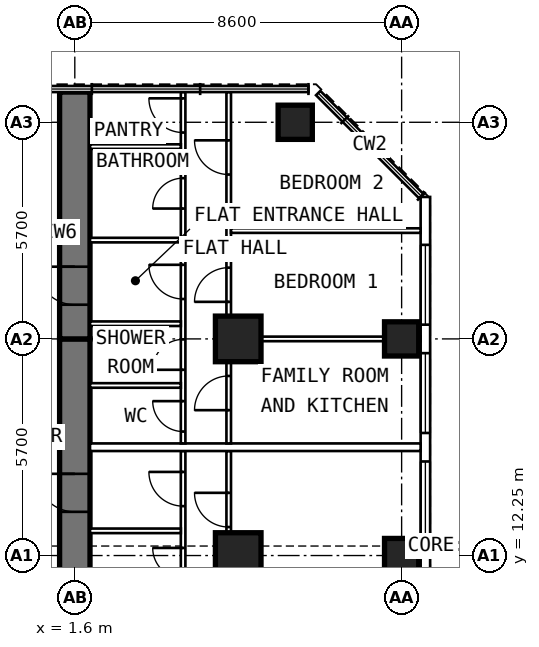
"""IFC4 building model, lengths in metres.
Left out: names, types, materials, properties, quantities, classifications, styles, units other than length and angle.
Written with IfcOpenShell. Run it as: python <this file> out.ifc"""

import sys

from ifc_helpers import new_model, si_unit, direction, frame, frame_2d, origin, origin_2d, place, context, subcontext, project, spatial, rectangle, extrude, element, fill, save


model = new_model("IFC4")
c1 = context("Model", 3, precision=1e-05, world=origin(), true_north=direction((0.0, 1.0)))
c2 = subcontext(c1, "Body", "Model", "MODEL_VIEW")
j1 = project(units=[si_unit("LENGTHUNIT", "METRE"), si_unit("PLANEANGLEUNIT", "RADIAN")], contexts=[c1])
p1 = place(None, origin())
s1 = spatial("IfcSite", under=j1, at=p1, CompositionType="ELEMENT")
p2 = place(p1, origin())
s2 = spatial("IfcBuilding", under=s1, at=p2, CompositionType="ELEMENT")
p3 = place(p2, frame((0.0, 0.0, 141.8)))
s3 = spatial("IfcBuildingStorey", under=s2, at=p3, CompositionType="ELEMENT", Elevation=141.8)
for number, where, z_axis, x_axis in (
    (1, (10.2, 12.25, 0.0), (0.0, 0.0, 1.0), (0.0, 1.0, 0.0)),
    (2, (10.2, 17.95, 0.0), (0.0, 0.0, 1.0), (0.0, 1.0, 0.0)),
    (3, (7.4, 23.65, 0.0), (0.0, 0.0, 1.0), (0.0, 1.0, 0.0)),
):
    element("IfcColumn", number, at=place(p3, frame(where, z_axis=z_axis, x_axis=x_axis)), inside=s3, PredefinedType="COLUMN", context=c2, shape_type="SweptSolid", body=[
        extrude(rectangle(XDim=0.9, YDim=0.9, at=origin_2d()), origin(), (0.0, 0.0, 1.0), 3.6),
    ])
for number, where, z_axis, x_axis in (
    (4, (5.9, 12.25, 0.0), (0.0, 0.0, 1.0), (0.0, 1.0, 0.0)),
    (5, (5.9, 17.95, 0.0), (0.0, 0.0, 1.0), (0.0, 1.0, 0.0)),
):
    element("IfcColumn", number, at=place(p3, frame(where, z_axis=z_axis, x_axis=x_axis)), inside=s3, PredefinedType="COLUMN", context=c2, shape_type="SweptSolid", body=[
        extrude(rectangle(XDim=1.2, YDim=1.2, at=origin_2d()), origin(), (0.0, 0.0, 1.0), 3.6),
    ])
p4 = place(p3, frame((1.6, 9.6, 0.0), z_axis=(0.0, 0.0, 1.0), x_axis=(0.0, 1.0, 0.0)))
e6 = element("IfcWall", 6, at=p4, inside=s3, PredefinedType="SHEAR", context=c2, shape_type="SweptSolid", body=[
    extrude(rectangle(XDim=8.35, YDim=0.8, at=frame_2d((4.175, 0.0))), origin(), (0.0, 0.0, 1.0), 3.6),
])
p5 = place(p4, frame((3.8, 0.0, 0.0)))
e7 = element("IfcOpeningElement", 7, at=p5, cuts=e6, PredefinedType="OPENING", context=c2, shape_type="SweptSolid", body=[
    extrude(rectangle(XDim=1.0, YDim=2.1, at=frame_2d((0.5, 1.05))), frame((0.0, 0.412, 0.0), z_axis=(0.0, -1.0, 0.0), x_axis=(1.0, 0.0, 0.0)), (0.0, 0.0, 1.0), 0.824),
])
p6 = place(p3, frame((1.6, 17.95, 0.0), z_axis=(0.0, 0.0, 1.0), x_axis=(0.0, 1.0, 0.0)))
e8 = element("IfcWall", 8, at=p6, inside=s3, PredefinedType="SHEAR", context=c2, shape_type="SweptSolid", body=[
    extrude(rectangle(XDim=6.495, YDim=0.8, at=frame_2d((3.248, 0.0))), origin(), (0.0, 0.0, 1.0), 3.6),
])
p7 = place(p6, frame((0.9, 0.0, 0.0)))
e9 = element("IfcOpeningElement", 9, at=p7, cuts=e8, PredefinedType="OPENING", context=c2, shape_type="SweptSolid", body=[
    extrude(rectangle(XDim=1.0, YDim=2.1, at=frame_2d((0.5, 1.05))), frame((0.0, 0.412, 0.0), z_axis=(0.0, -1.0, 0.0), x_axis=(1.0, 0.0, 0.0)), (0.0, 0.0, 1.0), 0.824),
])
p8 = place(p3, frame((10.825, 6.409, 0.0), z_axis=(0.0, 0.0, 1.0), x_axis=(0.0, 1.0, 0.0)))
e10 = element("IfcWall", 10, at=p8, inside=s3, PredefinedType="SOLIDWALL", context=c2, shape_type="SweptSolid", body=[
    extrude(rectangle(XDim=15.276, YDim=0.25, at=frame_2d((7.638, 0.0))), origin(), (0.0, 0.0, 1.0), 3.35),
])
p9 = place(p8, frame((0.516, 0.0, 0.8)))
e11 = element("IfcOpeningElement", 11, at=p9, cuts=e10, PredefinedType="OPENING", context=c2, shape_type="SweptSolid", body=[
    extrude(rectangle(XDim=2.1, YDim=1.8, at=frame_2d((1.05, 0.9))), frame((0.0, 0.137, 0.0), z_axis=(0.0, -1.0, 0.0), x_axis=(1.0, 0.0, 0.0)), (0.0, 0.0, 1.0), 0.274),
])
p10 = place(p8, frame((3.366, 0.0, 0.8)))
e12 = element("IfcOpeningElement", 12, at=p10, cuts=e10, PredefinedType="OPENING", context=c2, shape_type="SweptSolid", body=[
    extrude(rectangle(XDim=2.1, YDim=1.8, at=frame_2d((1.05, 0.9))), frame((0.0, 0.137, 0.0), z_axis=(0.0, -1.0, 0.0), x_axis=(1.0, 0.0, 0.0)), (0.0, 0.0, 1.0), 0.274),
])
p11 = place(p8, frame((6.216, 0.0, 0.8)))
e13 = element("IfcOpeningElement", 13, at=p11, cuts=e10, PredefinedType="OPENING", context=c2, shape_type="SweptSolid", body=[
    extrude(rectangle(XDim=2.1, YDim=1.8, at=frame_2d((1.05, 0.9))), frame((0.0, 0.137, 0.0), z_axis=(0.0, -1.0, 0.0), x_axis=(1.0, 0.0, 0.0)), (0.0, 0.0, 1.0), 0.274),
])
p12 = place(p8, frame((9.066, 0.0, 0.8)))
e14 = element("IfcOpeningElement", 14, at=p12, cuts=e10, PredefinedType="OPENING", context=c2, shape_type="SweptSolid", body=[
    extrude(rectangle(XDim=2.1, YDim=1.8, at=frame_2d((1.05, 0.9))), frame((0.0, 0.137, 0.0), z_axis=(0.0, -1.0, 0.0), x_axis=(1.0, 0.0, 0.0)), (0.0, 0.0, 1.0), 0.274),
])
p13 = place(p8, frame((11.916, 0.0, 0.8)))
e15 = element("IfcOpeningElement", 15, at=p13, cuts=e10, PredefinedType="OPENING", context=c2, shape_type="SweptSolid", body=[
    extrude(rectangle(XDim=2.1, YDim=1.8, at=frame_2d((1.05, 0.9))), frame((0.0, 0.137, 0.0), z_axis=(0.0, -1.0, 0.0), x_axis=(1.0, 0.0, 0.0)), (0.0, 0.0, 1.0), 0.274),
])
p14 = place(p3, frame((4.45, 10.05, 0.0), z_axis=(0.0, 0.0, 1.0), x_axis=(0.0, 1.0, 0.0)))
e16 = element("IfcWall", 16, at=p14, inside=s3, PredefinedType="PARTITIONING", context=c2, shape_type="SweptSolid", body=[
    extrude(rectangle(XDim=4.95, YDim=0.12, at=frame_2d((2.475, 0.0))), origin(), (0.0, 0.0, 1.0), 3.35),
])
p15 = place(p14, frame((1.6, 0.0, 0.0)))
e17 = element("IfcOpeningElement", 17, at=p15, cuts=e16, PredefinedType="OPENING", context=c2, shape_type="SweptSolid", body=[
    extrude(rectangle(XDim=0.8, YDim=2.1, at=frame_2d((0.4, 1.05))), frame((0.0, 0.072, 0.0), z_axis=(0.0, -1.0, 0.0), x_axis=(1.0, 0.0, 0.0)), (0.0, 0.0, 1.0), 0.144),
])
p16 = place(p14, frame((3.5, 0.0, 0.0)))
e18 = element("IfcOpeningElement", 18, at=p16, cuts=e16, PredefinedType="OPENING", context=c2, shape_type="SweptSolid", body=[
    extrude(rectangle(XDim=0.9, YDim=2.1, at=frame_2d((0.45, 1.05))), frame((0.0, 0.072, 0.0), z_axis=(0.0, -1.0, 0.0), x_axis=(1.0, 0.0, 0.0)), (0.0, 0.0, 1.0), 0.144),
])
p17 = place(p3, frame((5.65, 9.6, 0.0), z_axis=(0.0, 0.0, 1.0), x_axis=(0.0, 1.0, 0.0)))
e19 = element("IfcWall", 19, at=p17, inside=s3, PredefinedType="PARTITIONING", context=c2, shape_type="SweptSolid", body=[
    extrude(rectangle(XDim=5.4, YDim=0.12, at=frame_2d((2.7, 0.0))), origin(), (0.0, 0.0, 1.0), 3.35),
])
p18 = place(p17, frame((3.4, 0.0, 0.0)))
e20 = element("IfcOpeningElement", 20, at=p18, cuts=e19, PredefinedType="OPENING", context=c2, shape_type="SweptSolid", body=[
    extrude(rectangle(XDim=0.9, YDim=2.1, at=frame_2d((0.45, 1.05))), frame((0.0, 0.072, 0.0), z_axis=(0.0, -1.0, 0.0), x_axis=(1.0, 0.0, 0.0)), (0.0, 0.0, 1.0), 0.144),
])
p19 = place(p3, frame((2.0, 12.9, 0.0), z_axis=(0.0, 0.0, 1.0), x_axis=(1.0, 0.0, 0.0)))
e21 = element("IfcWall", 21, at=p19, inside=s3, PredefinedType="PARTITIONING", context=c2, shape_type="SweptSolid", body=[
    extrude(rectangle(XDim=2.39, YDim=0.12, at=frame_2d((1.195, 0.0))), origin(), (0.0, 0.0, 1.0), 3.35),
])
p20 = place(p3, frame((4.45, 15.2, 0.0), z_axis=(0.0, 0.0, 1.0), x_axis=(0.0, 1.0, 0.0)))
e22 = element("IfcWall", 22, at=p20, inside=s3, PredefinedType="PARTITIONING", context=c2, shape_type="SweptSolid", body=[
    extrude(rectangle(XDim=9.245, YDim=0.12, at=frame_2d((4.623, 0.0))), origin(), (0.0, 0.0, 1.0), 3.35),
])
p21 = place(p20, frame((0.312, 0.0, 0.0)))
e23 = element("IfcOpeningElement", 23, at=p21, cuts=e22, PredefinedType="OPENING", context=c2, shape_type="SweptSolid", body=[
    extrude(rectangle(XDim=0.8, YDim=2.1, at=frame_2d((0.4, 1.05))), frame((0.0, 0.072, 0.0), z_axis=(0.0, -1.0, 0.0), x_axis=(1.0, 0.0, 0.0)), (0.0, 0.0, 1.0), 0.144),
])
p22 = place(p20, frame((1.938, 0.0, 0.0)))
e24 = element("IfcOpeningElement", 24, at=p22, cuts=e22, PredefinedType="OPENING", context=c2, shape_type="SweptSolid", body=[
    extrude(rectangle(XDim=0.8, YDim=2.1, at=frame_2d((0.4, 1.05))), frame((0.0, 0.072, 0.0), z_axis=(0.0, -1.0, 0.0), x_axis=(1.0, 0.0, 0.0)), (0.0, 0.0, 1.0), 0.144),
])
p23 = place(p20, frame((3.8, 0.0, 0.0)))
e25 = element("IfcOpeningElement", 25, at=p23, cuts=e22, PredefinedType="OPENING", context=c2, shape_type="SweptSolid", body=[
    extrude(rectangle(XDim=0.9, YDim=2.1, at=frame_2d((0.45, 1.05))), frame((0.0, 0.072, 0.0), z_axis=(0.0, -1.0, 0.0), x_axis=(1.0, 0.0, 0.0)), (0.0, 0.0, 1.0), 0.144),
])
p24 = place(p20, frame((6.18, 0.0, 0.0)))
e26 = element("IfcOpeningElement", 26, at=p24, cuts=e22, PredefinedType="OPENING", context=c2, shape_type="SweptSolid", body=[
    extrude(rectangle(XDim=0.8, YDim=2.1, at=frame_2d((0.4, 1.05))), frame((0.0, 0.072, 0.0), z_axis=(0.0, -1.0, 0.0), x_axis=(1.0, 0.0, 0.0)), (0.0, 0.0, 1.0), 0.144),
])
p25 = place(p20, frame((8.18, 0.0, 0.0)))
e27 = element("IfcOpeningElement", 27, at=p25, cuts=e22, PredefinedType="OPENING", context=c2, shape_type="SweptSolid", body=[
    extrude(rectangle(XDim=0.9, YDim=2.1, at=frame_2d((0.45, 1.05))), frame((0.0, 0.072, 0.0), z_axis=(0.0, -1.0, 0.0), x_axis=(1.0, 0.0, 0.0)), (0.0, 0.0, 1.0), 0.144),
])
p26 = place(p3, frame((5.65, 15.2, 0.0), z_axis=(0.0, 0.0, 1.0), x_axis=(0.0, 1.0, 0.0)))
e28 = element("IfcWall", 28, at=p26, inside=s3, PredefinedType="PARTITIONING", context=c2, shape_type="SweptSolid", body=[
    extrude(rectangle(XDim=9.245, YDim=0.12, at=frame_2d((4.623, 0.0))), origin(), (0.0, 0.0, 1.0), 3.35),
])
p27 = place(p26, frame((0.875, 0.0, 0.0)))
e29 = element("IfcOpeningElement", 29, at=p27, cuts=e28, PredefinedType="OPENING", context=c2, shape_type="SweptSolid", body=[
    extrude(rectangle(XDim=0.9, YDim=2.1, at=frame_2d((0.45, 1.05))), frame((0.0, 0.072, 0.0), z_axis=(0.0, -1.0, 0.0), x_axis=(1.0, 0.0, 0.0)), (0.0, 0.0, 1.0), 0.144),
])
p28 = place(p26, frame((3.725, 0.0, 0.0)))
e30 = element("IfcOpeningElement", 30, at=p28, cuts=e28, PredefinedType="OPENING", context=c2, shape_type="SweptSolid", body=[
    extrude(rectangle(XDim=0.9, YDim=2.1, at=frame_2d((0.45, 1.05))), frame((0.0, 0.072, 0.0), z_axis=(0.0, -1.0, 0.0), x_axis=(1.0, 0.0, 0.0)), (0.0, 0.0, 1.0), 0.144),
])
p29 = place(p26, frame((7.075, 0.0, 0.0)))
e31 = element("IfcOpeningElement", 31, at=p29, cuts=e28, PredefinedType="OPENING", context=c2, shape_type="SweptSolid", body=[
    extrude(rectangle(XDim=0.9, YDim=2.1, at=frame_2d((0.45, 1.05))), frame((0.0, 0.072, 0.0), z_axis=(0.0, -1.0, 0.0), x_axis=(1.0, 0.0, 0.0)), (0.0, 0.0, 1.0), 0.144),
])
p30 = place(p3, frame((5.71, 17.95, 0.0), z_axis=(0.0, 0.0, 1.0), x_axis=(1.0, 0.0, 0.0)))
e32 = element("IfcWall", 32, at=p30, inside=s3, PredefinedType="PARTITIONING", context=c2, shape_type="SweptSolid", body=[
    extrude(rectangle(XDim=4.99, YDim=0.12, at=frame_2d((2.495, 0.0))), origin(), (0.0, 0.0, 1.0), 2.45),
])
p31 = place(p3, frame((5.71, 20.8, 0.0), z_axis=(0.0, 0.0, 1.0), x_axis=(1.0, 0.0, 0.0)))
e33 = element("IfcWall", 33, at=p31, inside=s3, PredefinedType="PARTITIONING", context=c2, shape_type="SweptSolid", body=[
    extrude(rectangle(XDim=4.99, YDim=0.12, at=frame_2d((2.495, 0.0))), origin(), (0.0, 0.0, 1.0), 3.35),
])
for number, where, z_axis, x_axis in (
    (34, (2.0, 16.725, 0.0), (0.0, 0.0, 1.0), (1.0, 0.0, 0.0)),
    (35, (2.0, 18.35, 0.0), (0.0, 0.0, 1.0), (1.0, 0.0, 0.0)),
    (36, (2.0, 20.55, 0.0), (0.0, 0.0, 1.0), (1.0, 0.0, 0.0)),
    (37, (2.0, 23.01, 0.0), (0.0, 0.0, 1.0), (1.0, 0.0, 0.0)),
):
    element("IfcWall", number, at=place(p3, frame(where, z_axis=z_axis, x_axis=x_axis)), inside=s3, PredefinedType="PARTITIONING", context=c2, shape_type="SweptSolid", body=[
        extrude(rectangle(XDim=2.39, YDim=0.12, at=frame_2d((1.195, 0.0))), origin(), (0.0, 0.0, 1.0), 3.35),
    ])
p32 = place(p3, frame((2.0, 15.1, 0.0), z_axis=(0.0, 0.0, 1.0), x_axis=(1.0, 0.0, 0.0)))
e38 = element("IfcWall", 38, at=p32, inside=s3, PredefinedType="PARTITIONING", context=c2, shape_type="SweptSolid", body=[
    extrude(rectangle(XDim=8.7, YDim=0.2, at=frame_2d((4.35, 0.0))), origin(), (0.0, 0.0, 1.0), 3.35),
])
p33 = place(p3, frame((1.2, 20.75, 0.0), z_axis=(0.0, 0.0, 1.0), x_axis=(-1.0, 0.0, 0.0)))
e39 = element("IfcWall", 39, at=p33, inside=s3, PredefinedType="PARTITIONING", context=c2, shape_type="SweptSolid", body=[
    extrude(rectangle(XDim=2.4, YDim=0.15, at=frame_2d((1.2, 0.0))), origin(), (0.0, 0.0, 1.0), 3.35),
])
p34 = place(p33, frame((0.7, 0.0, 0.0)))
e40 = element("IfcOpeningElement", 40, at=p34, cuts=e39, PredefinedType="OPENING", context=c2, shape_type="SweptSolid", body=[
    extrude(rectangle(XDim=1.0, YDim=2.1, at=frame_2d((0.5, 1.05))), frame((0.0, 0.087, 0.0), z_axis=(0.0, -1.0, 0.0), x_axis=(1.0, 0.0, 0.0)), (0.0, 0.0, 1.0), 0.174),
])
p35 = place(p11, origin())
e41 = element("IfcWindow", 41, at=p35, inside=s3, PartitioningType="SINGLE_PANEL", PredefinedType="WINDOW", context=c2, shape_type="SweptSolid", body=[
    extrude(rectangle(XDim=2.1, YDim=1.8, at=frame_2d((1.05, 0.9))), frame((0.0, 0.03, 0.0), z_axis=(0.0, -1.0, 0.0), x_axis=(1.0, 0.0, 0.0)), (0.0, 0.0, 1.0), 0.06),
])
fill(e13, e41)
p36 = place(p12, origin())
e42 = element("IfcWindow", 42, at=p36, inside=s3, PartitioningType="SINGLE_PANEL", PredefinedType="WINDOW", context=c2, shape_type="SweptSolid", body=[
    extrude(rectangle(XDim=2.1, YDim=1.8, at=frame_2d((1.05, 0.9))), frame((0.0, 0.03, 0.0), z_axis=(0.0, -1.0, 0.0), x_axis=(1.0, 0.0, 0.0)), (0.0, 0.0, 1.0), 0.06),
])
fill(e14, e42)
p37 = place(p13, origin())
e43 = element("IfcWindow", 43, at=p37, inside=s3, PartitioningType="SINGLE_PANEL", PredefinedType="WINDOW", context=c2, shape_type="SweptSolid", body=[
    extrude(rectangle(XDim=2.1, YDim=1.8, at=frame_2d((1.05, 0.9))), frame((0.0, 0.03, 0.0), z_axis=(0.0, -1.0, 0.0), x_axis=(1.0, 0.0, 0.0)), (0.0, 0.0, 1.0), 0.06),
])
fill(e15, e43)
p38 = place(p5, origin())
e44 = element("IfcDoor", 44, at=p38, inside=s3, OperationType="SINGLE_SWING_RIGHT", PredefinedType="DOOR", context=c2, shape_type="SweptSolid", body=[
    extrude(rectangle(XDim=1.0, YDim=2.1, at=frame_2d((0.5, 1.05))), frame((0.0, 0.15, 0.0), z_axis=(0.0, -1.0, 0.0), x_axis=(1.0, 0.0, 0.0)), (0.0, 0.0, 1.0), 0.3),
])
fill(e7, e44)
p39 = place(p18, origin())
e45 = element("IfcDoor", 45, at=p39, inside=s3, OperationType="SINGLE_SWING_RIGHT", PredefinedType="DOOR", context=c2, shape_type="SweptSolid", body=[
    extrude(rectangle(XDim=0.9, YDim=2.1, at=frame_2d((0.45, 1.05))), frame((0.0, 0.025, 0.0), z_axis=(0.0, -1.0, 0.0), x_axis=(1.0, 0.0, 0.0)), (0.0, 0.0, 1.0), 0.05),
])
fill(e20, e45)
p40 = place(p15, origin())
e46 = element("IfcDoor", 46, at=p40, inside=s3, OperationType="SINGLE_SWING_RIGHT", PredefinedType="DOOR", context=c2, shape_type="SweptSolid", body=[
    extrude(rectangle(XDim=0.8, YDim=2.1, at=frame_2d((0.4, 1.05))), frame((0.0, 0.025, 0.0), z_axis=(0.0, -1.0, 0.0), x_axis=(1.0, 0.0, 0.0)), (0.0, 0.0, 1.0), 0.05),
])
fill(e17, e46)
p41 = place(p16, origin())
e47 = element("IfcDoor", 47, at=p41, inside=s3, OperationType="SINGLE_SWING_RIGHT", PredefinedType="DOOR", context=c2, shape_type="SweptSolid", body=[
    extrude(rectangle(XDim=0.9, YDim=2.1, at=frame_2d((0.45, 1.05))), frame((0.0, 0.025, 0.0), z_axis=(0.0, -1.0, 0.0), x_axis=(1.0, 0.0, 0.0)), (0.0, 0.0, 1.0), 0.05),
])
fill(e18, e47)
p42 = place(p7, origin())
e48 = element("IfcDoor", 48, at=p42, inside=s3, OperationType="SINGLE_SWING_RIGHT", PredefinedType="DOOR", context=c2, shape_type="SweptSolid", body=[
    extrude(rectangle(XDim=1.0, YDim=2.1, at=frame_2d((0.5, 1.05))), frame((0.0, 0.15, 0.0), z_axis=(0.0, -1.0, 0.0), x_axis=(1.0, 0.0, 0.0)), (0.0, 0.0, 1.0), 0.3),
])
fill(e9, e48)
p43 = place(p27, origin())
e49 = element("IfcDoor", 49, at=p43, inside=s3, OperationType="SINGLE_SWING_LEFT", PredefinedType="DOOR", context=c2, shape_type="SweptSolid", body=[
    extrude(rectangle(XDim=0.9, YDim=2.1, at=frame_2d((0.45, 1.05))), frame((0.0, 0.025, 0.0), z_axis=(0.0, -1.0, 0.0), x_axis=(1.0, 0.0, 0.0)), (0.0, 0.0, 1.0), 0.05),
])
fill(e29, e49)
p44 = place(p28, origin())
e50 = element("IfcDoor", 50, at=p44, inside=s3, OperationType="SINGLE_SWING_LEFT", PredefinedType="DOOR", context=c2, shape_type="SweptSolid", body=[
    extrude(rectangle(XDim=0.9, YDim=2.1, at=frame_2d((0.45, 1.05))), frame((0.0, 0.025, 0.0), z_axis=(0.0, -1.0, 0.0), x_axis=(1.0, 0.0, 0.0)), (0.0, 0.0, 1.0), 0.05),
])
fill(e30, e50)
p45 = place(p29, origin())
e51 = element("IfcDoor", 51, at=p45, inside=s3, OperationType="SINGLE_SWING_RIGHT", PredefinedType="DOOR", context=c2, shape_type="SweptSolid", body=[
    extrude(rectangle(XDim=0.9, YDim=2.1, at=frame_2d((0.45, 1.05))), frame((0.0, 0.025, 0.0), z_axis=(0.0, -1.0, 0.0), x_axis=(1.0, 0.0, 0.0)), (0.0, 0.0, 1.0), 0.05),
])
fill(e31, e51)
p46 = place(p21, origin())
e52 = element("IfcDoor", 52, at=p46, inside=s3, OperationType="SINGLE_SWING_RIGHT", PredefinedType="DOOR", context=c2, shape_type="SweptSolid", body=[
    extrude(rectangle(XDim=0.8, YDim=2.1, at=frame_2d((0.4, 1.05))), frame((0.0, 0.025, 0.0), z_axis=(0.0, -1.0, 0.0), x_axis=(1.0, 0.0, 0.0)), (0.0, 0.0, 1.0), 0.05),
])
fill(e23, e52)
p47 = place(p22, origin())
e53 = element("IfcDoor", 53, at=p47, inside=s3, OperationType="SINGLE_SWING_LEFT", PredefinedType="DOOR", context=c2, shape_type="SweptSolid", body=[
    extrude(rectangle(XDim=0.8, YDim=2.1, at=frame_2d((0.4, 1.05))), frame((0.0, 0.025, 0.0), z_axis=(0.0, -1.0, 0.0), x_axis=(1.0, 0.0, 0.0)), (0.0, 0.0, 1.0), 0.05),
])
fill(e24, e53)
p48 = place(p23, origin())
e54 = element("IfcDoor", 54, at=p48, inside=s3, OperationType="SINGLE_SWING_RIGHT", PredefinedType="DOOR", context=c2, shape_type="SweptSolid", body=[
    extrude(rectangle(XDim=0.9, YDim=2.1, at=frame_2d((0.45, 1.05))), frame((0.0, 0.025, 0.0), z_axis=(0.0, -1.0, 0.0), x_axis=(1.0, 0.0, 0.0)), (0.0, 0.0, 1.0), 0.05),
])
fill(e25, e54)
p49 = place(p24, origin())
e55 = element("IfcDoor", 55, at=p49, inside=s3, OperationType="SINGLE_SWING_LEFT", PredefinedType="DOOR", context=c2, shape_type="SweptSolid", body=[
    extrude(rectangle(XDim=0.8, YDim=2.1, at=frame_2d((0.4, 1.05))), frame((0.0, 0.025, 0.0), z_axis=(0.0, -1.0, 0.0), x_axis=(1.0, 0.0, 0.0)), (0.0, 0.0, 1.0), 0.05),
])
fill(e26, e55)
p50 = place(p25, origin())
e56 = element("IfcDoor", 56, at=p50, inside=s3, OperationType="SINGLE_SWING_RIGHT", PredefinedType="DOOR", context=c2, shape_type="SweptSolid", body=[
    extrude(rectangle(XDim=0.9, YDim=2.1, at=frame_2d((0.45, 1.05))), frame((0.0, 0.025, 0.0), z_axis=(0.0, -1.0, 0.0), x_axis=(1.0, 0.0, 0.0)), (0.0, 0.0, 1.0), 0.05),
])
fill(e27, e56)
save(model, sys.argv[1])
